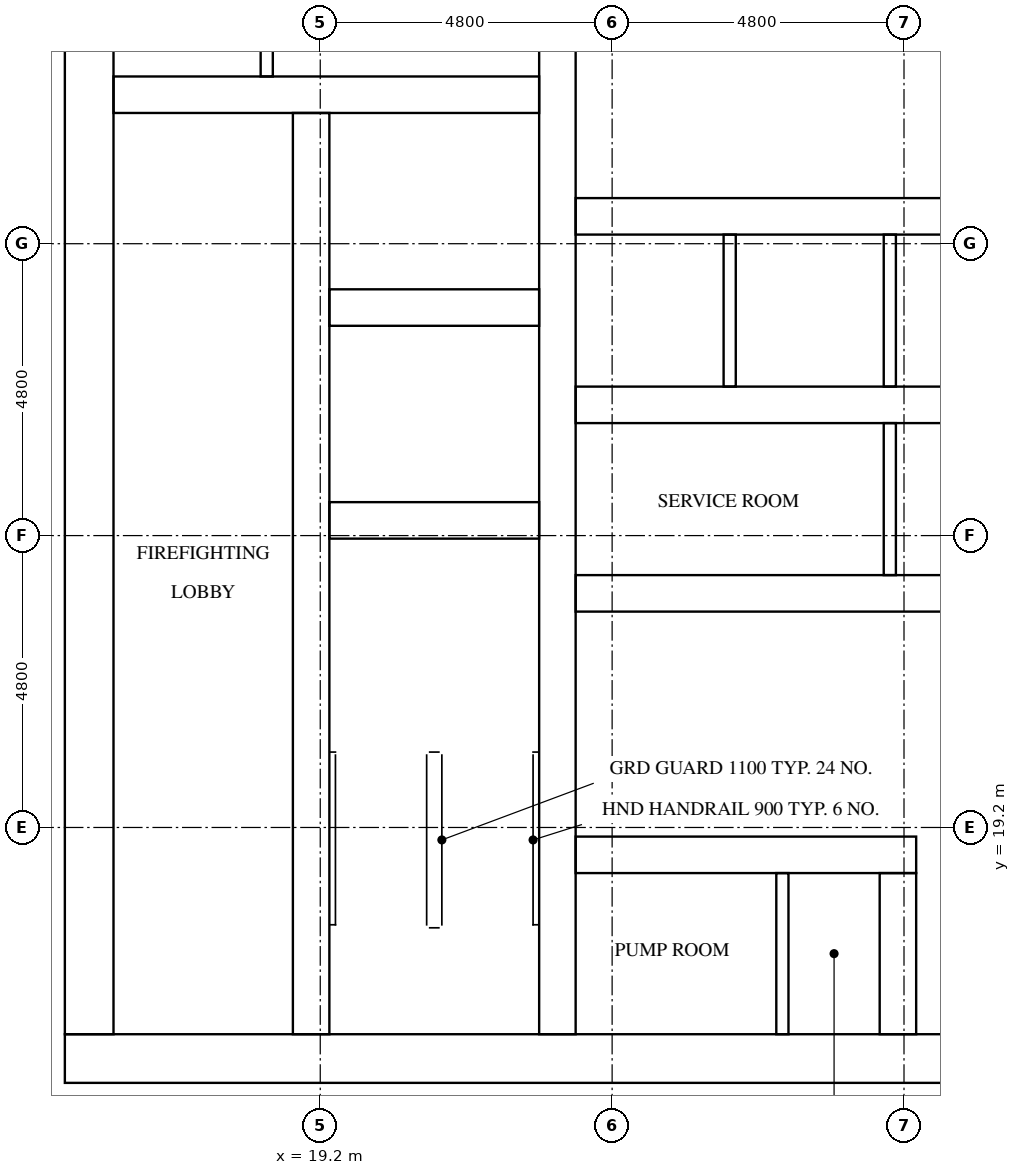
"""IFC4 building model, lengths in metres.
Left out: names, types, materials, properties, quantities, classifications, styles, units other than length and angle.
Written with IfcOpenShell. Run it as: python <this file> out.ifc"""

import sys

from ifc_helpers import new_model, si_unit, direction, frame, frame_2d, origin, place, context, subcontext, project, spatial, rectangle, extrude, element, fill, save


model = new_model("IFC4")
c1 = context("Model", 3, precision=1e-05, world=origin(), true_north=direction((0.0, 1.0)))
c2 = subcontext(c1, "Body", "Model", "MODEL_VIEW")
j1 = project(units=[si_unit("LENGTHUNIT", "METRE"), si_unit("PLANEANGLEUNIT", "RADIAN")], contexts=[c1])
p1 = place(None, origin())
s1 = spatial("IfcSite", under=j1, at=p1, CompositionType="ELEMENT")
p2 = place(p1, origin())
s2 = spatial("IfcBuilding", under=s1, at=p2, CompositionType="ELEMENT")
p3 = place(p2, frame((0.0, 0.0, 170.0)))
s3 = spatial("IfcBuildingStorey", under=s2, at=p3, CompositionType="ELEMENT", Elevation=170.0)
p4 = place(p3, frame((15.0, 15.4, 0.0), z_axis=(0.0, 0.0, 1.0), x_axis=(1.0, 0.0, 0.0)))
e1 = element("IfcWall", 1, at=p4, inside=s3, PredefinedType="SHEAR", context=c2, shape_type="SweptSolid", body=[
    extrude(rectangle(XDim=32.4, YDim=0.8, at=frame_2d((16.2, 0.0))), origin(), (0.0, 0.0, 1.0), 3.1),
])
p5 = place(p4, frame((15.3, 0.0, 0.0)))
e2 = element("IfcOpeningElement", 2, at=p5, cuts=e1, PredefinedType="OPENING", context=c2, shape_type="SweptSolid", body=[
    extrude(rectangle(XDim=1.8, YDim=2.1, at=frame_2d((0.9, 1.05))), frame((0.0, 0.41, 0.0), z_axis=(0.0, -1.0, 0.0), x_axis=(1.0, 0.0, 0.0)), (0.0, 0.0, 1.0), 0.82),
])
p6 = place(p3, frame((15.4, 15.8, 0.0), z_axis=(0.0, 0.0, 1.0), x_axis=(0.0, 1.0, 0.0)))
e3 = element("IfcWall", 3, at=p6, inside=s3, PredefinedType="SHEAR", context=c2, shape_type="SweptSolid", body=[
    extrude(rectangle(XDim=21.2, YDim=0.8, at=frame_2d((10.6, 0.0))), origin(), (0.0, 0.0, 1.0), 3.1),
])
p7 = place(p6, frame((4.96, 0.0, 0.0)))
e4 = element("IfcOpeningElement", 4, at=p7, cuts=e3, PredefinedType="OPENING", context=c2, shape_type="SweptSolid", body=[
    extrude(rectangle(XDim=1.2, YDim=2.1, at=frame_2d((0.6, 1.05))), frame((0.0, 0.41, 0.0), z_axis=(0.0, -1.0, 0.0), x_axis=(1.0, 0.0, 0.0)), (0.0, 0.0, 1.0), 0.82),
])
p8 = place(p3, frame((19.05, 15.8, 0.0), z_axis=(0.0, 0.0, 1.0), x_axis=(0.0, 1.0, 0.0)))
e5 = element("IfcWall", 5, at=p8, inside=s3, PredefinedType="SHEAR", context=c2, shape_type="SweptSolid", body=[
    extrude(rectangle(XDim=15.15, YDim=0.6, at=frame_2d((7.575, 0.0))), origin(), (0.0, 0.0, 1.0), 3.1),
])
p9 = place(p8, frame((9.65, 0.0, 0.0)))
e6 = element("IfcOpeningElement", 6, at=p9, cuts=e5, PredefinedType="OPENING", context=c2, shape_type="SweptSolid", body=[
    extrude(rectangle(XDim=1.1, YDim=2.1, at=frame_2d((0.55, 1.05))), frame((0.0, 0.31, 0.0), z_axis=(0.0, -1.0, 0.0), x_axis=(1.0, 0.0, 0.0)), (0.0, 0.0, 1.0), 0.62),
])
p10 = place(p8, frame((13.15, 0.0, 0.0)))
e7 = element("IfcOpeningElement", 7, at=p10, cuts=e5, PredefinedType="OPENING", context=c2, shape_type="SweptSolid", body=[
    extrude(rectangle(XDim=1.1, YDim=2.1, at=frame_2d((0.55, 1.05))), frame((0.0, 0.31, 0.0), z_axis=(0.0, -1.0, 0.0), x_axis=(1.0, 0.0, 0.0)), (0.0, 0.0, 1.0), 0.62),
])
p11 = place(p8, frame((0.4, 0.0, 0.0)))
e8 = element("IfcOpeningElement", 8, at=p11, cuts=e5, PredefinedType="OPENING", context=c2, shape_type="SweptSolid", body=[
    extrude(rectangle(XDim=1.2, YDim=2.1, at=frame_2d((0.6, 1.05))), frame((0.0, 0.31, 0.0), z_axis=(0.0, -1.0, 0.0), x_axis=(1.0, 0.0, 0.0)), (0.0, 0.0, 1.0), 0.62),
])
p12 = place(p3, frame((23.1, 15.8, 0.0), z_axis=(0.0, 0.0, 1.0), x_axis=(0.0, 1.0, 0.0)))
e9 = element("IfcWall", 9, at=p12, inside=s3, PredefinedType="SHEAR", context=c2, shape_type="SweptSolid", body=[
    extrude(rectangle(XDim=21.2, YDim=0.6, at=frame_2d((10.6, 0.0))), origin(), (0.0, 0.0, 1.0), 3.1),
])
for number, where, z_axis, x_axis in (
    (10, (19.35, 24.25, 0.0), (0.0, 0.0, 1.0), (1.0, 0.0, 0.0)),
    (11, (19.35, 27.75, 0.0), (0.0, 0.0, 1.0), (1.0, 0.0, 0.0)),
):
    element("IfcWall", number, at=place(p3, frame(where, z_axis=z_axis, x_axis=x_axis)), inside=s3, PredefinedType="SHEAR", context=c2, shape_type="SweptSolid", body=[
        extrude(rectangle(XDim=3.45, YDim=0.6, at=frame_2d((1.725, 0.0))), origin(), (0.0, 0.0, 1.0), 3.1),
    ])
p13 = place(p3, frame((15.8, 31.25, 0.0), z_axis=(0.0, 0.0, 1.0), x_axis=(1.0, 0.0, 0.0)))
e12 = element("IfcWall", 12, at=p13, inside=s3, PredefinedType="SHEAR", context=c2, shape_type="SweptSolid", body=[
    extrude(rectangle(XDim=7.0, YDim=0.6, at=frame_2d((3.5, 0.0))), origin(), (0.0, 0.0, 1.0), 3.1),
])
p14 = place(p3, frame((23.4, 18.75, 0.0), z_axis=(0.0, 0.0, 1.0), x_axis=(1.0, 0.0, 0.0)))
e13 = element("IfcWall", 13, at=p14, inside=s3, PredefinedType="SHEAR", context=c2, shape_type="SweptSolid", body=[
    extrude(rectangle(XDim=5.6, YDim=0.6, at=frame_2d((2.8, 0.0))), origin(), (0.0, 0.0, 1.0), 3.1),
])
p15 = place(p14, frame((1.15, 0.0, 0.0)))
e14 = element("IfcOpeningElement", 14, at=p15, cuts=e13, PredefinedType="OPENING", context=c2, shape_type="SweptSolid", body=[
    extrude(rectangle(XDim=1.0, YDim=2.1, at=frame_2d((0.5, 1.05))), frame((0.0, 0.31, 0.0), z_axis=(0.0, -1.0, 0.0), x_axis=(1.0, 0.0, 0.0)), (0.0, 0.0, 1.0), 0.62),
])
p16 = place(p14, frame((3.75, 0.0, 0.0)))
e15 = element("IfcOpeningElement", 15, at=p16, cuts=e13, PredefinedType="OPENING", context=c2, shape_type="SweptSolid", body=[
    extrude(rectangle(XDim=1.0, YDim=2.1, at=frame_2d((0.5, 1.05))), frame((0.0, 0.31, 0.0), z_axis=(0.0, -1.0, 0.0), x_axis=(1.0, 0.0, 0.0)), (0.0, 0.0, 1.0), 0.62),
])
p17 = place(p3, frame((23.4, 23.05, 0.0), z_axis=(0.0, 0.0, 1.0), x_axis=(1.0, 0.0, 0.0)))
e16 = element("IfcWall", 16, at=p17, inside=s3, PredefinedType="SHEAR", context=c2, shape_type="SweptSolid", body=[
    extrude(rectangle(XDim=15.6, YDim=0.6, at=frame_2d((7.8, 0.0))), origin(), (0.0, 0.0, 1.0), 3.1),
])
p18 = place(p17, frame((2.033, 0.0, 0.0)))
e17 = element("IfcOpeningElement", 17, at=p18, cuts=e16, PredefinedType="OPENING", context=c2, shape_type="SweptSolid", body=[
    extrude(rectangle(XDim=1.0, YDim=2.1, at=frame_2d((0.5, 1.05))), frame((0.0, 0.31, 0.0), z_axis=(0.0, -1.0, 0.0), x_axis=(1.0, 0.0, 0.0)), (0.0, 0.0, 1.0), 0.62),
])
p19 = place(p17, frame((11.706, 0.0, 0.0)))
e18 = element("IfcOpeningElement", 18, at=p19, cuts=e16, PredefinedType="OPENING", context=c2, shape_type="SweptSolid", body=[
    extrude(rectangle(XDim=1.0, YDim=2.1, at=frame_2d((0.5, 1.05))), frame((0.0, 0.31, 0.0), z_axis=(0.0, -1.0, 0.0), x_axis=(1.0, 0.0, 0.0)), (0.0, 0.0, 1.0), 0.62),
])
p20 = place(p17, frame((14.339, 0.0, 0.0)))
e19 = element("IfcOpeningElement", 19, at=p20, cuts=e16, PredefinedType="OPENING", context=c2, shape_type="SweptSolid", body=[
    extrude(rectangle(XDim=1.0, YDim=2.1, at=frame_2d((0.5, 1.05))), frame((0.0, 0.31, 0.0), z_axis=(0.0, -1.0, 0.0), x_axis=(1.0, 0.0, 0.0)), (0.0, 0.0, 1.0), 0.62),
])
p21 = place(p3, frame((23.4, 26.15, 0.0), z_axis=(0.0, 0.0, 1.0), x_axis=(1.0, 0.0, 0.0)))
e20 = element("IfcWall", 20, at=p21, inside=s3, PredefinedType="SHEAR", context=c2, shape_type="SweptSolid", body=[
    extrude(rectangle(XDim=15.6, YDim=0.6, at=frame_2d((7.8, 0.0))), origin(), (0.0, 0.0, 1.0), 3.1),
])
p22 = place(p3, frame((23.4, 29.25, 0.0), z_axis=(0.0, 0.0, 1.0), x_axis=(1.0, 0.0, 0.0)))
e21 = element("IfcWall", 21, at=p22, inside=s3, PredefinedType="SHEAR", context=c2, shape_type="SweptSolid", body=[
    extrude(rectangle(XDim=15.6, YDim=0.6, at=frame_2d((7.8, 0.0))), origin(), (0.0, 0.0, 1.0), 3.1),
])
p23 = place(p22, frame((0.667, 0.0, 0.0)))
e22 = element("IfcOpeningElement", 22, at=p23, cuts=e21, PredefinedType="OPENING", context=c2, shape_type="SweptSolid", body=[
    extrude(rectangle(XDim=1.1, YDim=2.1, at=frame_2d((0.55, 1.05))), frame((0.0, 0.31, 0.0), z_axis=(0.0, -1.0, 0.0), x_axis=(1.0, 0.0, 0.0)), (0.0, 0.0, 1.0), 0.62),
])
p24 = place(p22, frame((3.3, 0.0, 0.0)))
e23 = element("IfcOpeningElement", 23, at=p24, cuts=e21, PredefinedType="OPENING", context=c2, shape_type="SweptSolid", body=[
    extrude(rectangle(XDim=1.1, YDim=2.1, at=frame_2d((0.55, 1.05))), frame((0.0, 0.31, 0.0), z_axis=(0.0, -1.0, 0.0), x_axis=(1.0, 0.0, 0.0)), (0.0, 0.0, 1.0), 0.62),
])
p25 = place(p22, frame((5.933, 0.0, 0.0)))
e24 = element("IfcOpeningElement", 24, at=p25, cuts=e21, PredefinedType="OPENING", context=c2, shape_type="SweptSolid", body=[
    extrude(rectangle(XDim=1.1, YDim=2.1, at=frame_2d((0.55, 1.05))), frame((0.0, 0.31, 0.0), z_axis=(0.0, -1.0, 0.0), x_axis=(1.0, 0.0, 0.0)), (0.0, 0.0, 1.0), 0.62),
])
p26 = place(p22, frame((8.567, 0.0, 0.0)))
e25 = element("IfcOpeningElement", 25, at=p26, cuts=e21, PredefinedType="OPENING", context=c2, shape_type="SweptSolid", body=[
    extrude(rectangle(XDim=1.1, YDim=2.1, at=frame_2d((0.55, 1.05))), frame((0.0, 0.31, 0.0), z_axis=(0.0, -1.0, 0.0), x_axis=(1.0, 0.0, 0.0)), (0.0, 0.0, 1.0), 0.62),
])
p27 = place(p22, frame((11.2, 0.0, 0.0)))
e26 = element("IfcOpeningElement", 26, at=p27, cuts=e21, PredefinedType="OPENING", context=c2, shape_type="SweptSolid", body=[
    extrude(rectangle(XDim=1.1, YDim=2.1, at=frame_2d((0.55, 1.05))), frame((0.0, 0.31, 0.0), z_axis=(0.0, -1.0, 0.0), x_axis=(1.0, 0.0, 0.0)), (0.0, 0.0, 1.0), 0.62),
])
p28 = place(p22, frame((13.833, 0.0, 0.0)))
e27 = element("IfcOpeningElement", 27, at=p28, cuts=e21, PredefinedType="OPENING", context=c2, shape_type="SweptSolid", body=[
    extrude(rectangle(XDim=1.1, YDim=2.1, at=frame_2d((0.55, 1.05))), frame((0.0, 0.31, 0.0), z_axis=(0.0, -1.0, 0.0), x_axis=(1.0, 0.0, 0.0)), (0.0, 0.0, 1.0), 0.62),
])
p29 = place(p3, frame((28.7, 15.8, 0.0), z_axis=(0.0, 0.0, 1.0), x_axis=(0.0, 1.0, 0.0)))
e28 = element("IfcWall", 28, at=p29, inside=s3, PredefinedType="SHEAR", context=c2, shape_type="SweptSolid", body=[
    extrude(rectangle(XDim=2.65, YDim=0.6, at=frame_2d((1.325, 0.0))), origin(), (0.0, 0.0, 1.0), 3.1),
])
for number, where, z_axis, x_axis in (
    (29, (25.933, 26.45, 0.0), (0.0, 0.0, 1.0), (0.0, 1.0, 0.0)),
    (30, (28.567, 23.35, 0.0), (0.0, 0.0, 1.0), (0.0, 1.0, 0.0)),
    (31, (28.567, 26.45, 0.0), (0.0, 0.0, 1.0), (0.0, 1.0, 0.0)),
):
    element("IfcWall", number, at=place(p3, frame(where, z_axis=z_axis, x_axis=x_axis)), inside=s3, PredefinedType="SOLIDWALL", context=c2, shape_type="SweptSolid", body=[
        extrude(rectangle(XDim=2.5, YDim=0.2, at=frame_2d((1.25, 0.0))), origin(), (0.0, 0.0, 1.0), 3.1),
    ])
p30 = place(p3, frame((18.32, 31.55, 0.0), z_axis=(0.0, 0.0, 1.0), x_axis=(0.0, 1.0, 0.0)))
e32 = element("IfcWall", 32, at=p30, inside=s3, PredefinedType="PARTITIONING", context=c2, shape_type="SweptSolid", body=[
    extrude(rectangle(XDim=5.45, YDim=0.2, at=frame_2d((2.725, 0.0))), origin(), (0.0, 0.0, 1.0), 3.1),
])
p31 = place(p3, frame((26.8, 15.8, 0.0), z_axis=(0.0, 0.0, 1.0), x_axis=(0.0, 1.0, 0.0)))
e33 = element("IfcWall", 33, at=p31, inside=s3, PredefinedType="PARTITIONING", context=c2, shape_type="SweptSolid", body=[
    extrude(rectangle(XDim=2.65, YDim=0.2, at=frame_2d((1.325, 0.0))), origin(), (0.0, 0.0, 1.0), 3.1),
])
p32 = place(p23, origin())
e34 = element("IfcDoor", 34, at=p32, inside=s3, OperationType="DOUBLE_DOOR_SLIDING", PredefinedType="DOOR", context=c2, shape_type="SweptSolid", body=[
    extrude(rectangle(XDim=1.1, YDim=2.1, at=frame_2d((0.55, 1.05))), frame((0.0, 0.025, 0.0), z_axis=(0.0, -1.0, 0.0), x_axis=(1.0, 0.0, 0.0)), (0.0, 0.0, 1.0), 0.05),
])
fill(e22, e34)
p33 = place(p24, origin())
e35 = element("IfcDoor", 35, at=p33, inside=s3, OperationType="DOUBLE_DOOR_SLIDING", PredefinedType="DOOR", context=c2, shape_type="SweptSolid", body=[
    extrude(rectangle(XDim=1.1, YDim=2.1, at=frame_2d((0.55, 1.05))), frame((0.0, 0.025, 0.0), z_axis=(0.0, -1.0, 0.0), x_axis=(1.0, 0.0, 0.0)), (0.0, 0.0, 1.0), 0.05),
])
fill(e23, e35)
p34 = place(p25, origin())
e36 = element("IfcDoor", 36, at=p34, inside=s3, OperationType="DOUBLE_DOOR_SLIDING", PredefinedType="DOOR", context=c2, shape_type="SweptSolid", body=[
    extrude(rectangle(XDim=1.1, YDim=2.1, at=frame_2d((0.55, 1.05))), frame((0.0, 0.025, 0.0), z_axis=(0.0, -1.0, 0.0), x_axis=(1.0, 0.0, 0.0)), (0.0, 0.0, 1.0), 0.05),
])
fill(e24, e36)
p35 = place(p9, origin())
e37 = element("IfcDoor", 37, at=p35, inside=s3, OperationType="DOUBLE_DOOR_SLIDING", PredefinedType="DOOR", context=c2, shape_type="SweptSolid", body=[
    extrude(rectangle(XDim=1.1, YDim=2.1, at=frame_2d((0.55, 1.05))), frame((0.0, 0.025, 0.0), z_axis=(0.0, -1.0, 0.0), x_axis=(1.0, 0.0, 0.0)), (0.0, 0.0, 1.0), 0.05),
])
fill(e6, e37)
p36 = place(p10, origin())
e38 = element("IfcDoor", 38, at=p36, inside=s3, OperationType="DOUBLE_DOOR_SLIDING", PredefinedType="DOOR", context=c2, shape_type="SweptSolid", body=[
    extrude(rectangle(XDim=1.1, YDim=2.1, at=frame_2d((0.55, 1.05))), frame((0.0, 0.025, 0.0), z_axis=(0.0, -1.0, 0.0), x_axis=(1.0, 0.0, 0.0)), (0.0, 0.0, 1.0), 0.05),
])
fill(e7, e38)
p37 = place(p11, frame((1.2, 0.0, 0.0), z_axis=(0.0, 0.0, 1.0), x_axis=(-1.0, 0.0, 0.0)))
e39 = element("IfcDoor", 39, at=p37, inside=s3, OperationType="SINGLE_SWING_RIGHT", PredefinedType="DOOR", context=c2, shape_type="SweptSolid", body=[
    extrude(rectangle(XDim=1.2, YDim=2.1, at=frame_2d((0.6, 1.05))), frame((0.0, 0.025, 0.0), z_axis=(0.0, -1.0, 0.0), x_axis=(1.0, 0.0, 0.0)), (0.0, 0.0, 1.0), 0.05),
])
fill(e8, e39)
p38 = place(p7, frame((1.2, 0.0, 0.0), z_axis=(0.0, 0.0, 1.0), x_axis=(-1.0, 0.0, 0.0)))
e40 = element("IfcDoor", 40, at=p38, inside=s3, OperationType="SINGLE_SWING_LEFT", PredefinedType="DOOR", context=c2, shape_type="SweptSolid", body=[
    extrude(rectangle(XDim=1.2, YDim=2.1, at=frame_2d((0.6, 1.05))), frame((0.0, 0.025, 0.0), z_axis=(0.0, -1.0, 0.0), x_axis=(1.0, 0.0, 0.0)), (0.0, 0.0, 1.0), 0.05),
])
fill(e4, e40)
p39 = place(p18, frame((1.0, 0.0, 0.0), z_axis=(0.0, 0.0, 1.0), x_axis=(-1.0, 0.0, 0.0)))
e41 = element("IfcDoor", 41, at=p39, inside=s3, OperationType="SINGLE_SWING_LEFT", PredefinedType="DOOR", context=c2, shape_type="SweptSolid", body=[
    extrude(rectangle(XDim=1.0, YDim=2.1, at=frame_2d((0.5, 1.05))), frame((0.0, 0.025, 0.0), z_axis=(0.0, -1.0, 0.0), x_axis=(1.0, 0.0, 0.0)), (0.0, 0.0, 1.0), 0.05),
])
fill(e17, e41)
p40 = place(p15, origin())
e42 = element("IfcDoor", 42, at=p40, inside=s3, OperationType="SINGLE_SWING_RIGHT", PredefinedType="DOOR", context=c2, shape_type="SweptSolid", body=[
    extrude(rectangle(XDim=1.0, YDim=2.1, at=frame_2d((0.5, 1.05))), frame((0.0, 0.025, 0.0), z_axis=(0.0, -1.0, 0.0), x_axis=(1.0, 0.0, 0.0)), (0.0, 0.0, 1.0), 0.05),
])
fill(e14, e42)
p41 = place(p16, origin())
e43 = element("IfcDoor", 43, at=p41, inside=s3, OperationType="SINGLE_SWING_LEFT", PredefinedType="DOOR", context=c2, shape_type="SweptSolid", body=[
    extrude(rectangle(XDim=1.0, YDim=2.1, at=frame_2d((0.5, 1.05))), frame((0.0, 0.025, 0.0), z_axis=(0.0, -1.0, 0.0), x_axis=(1.0, 0.0, 0.0)), (0.0, 0.0, 1.0), 0.05),
])
fill(e15, e43)
save(model, sys.argv[1])
